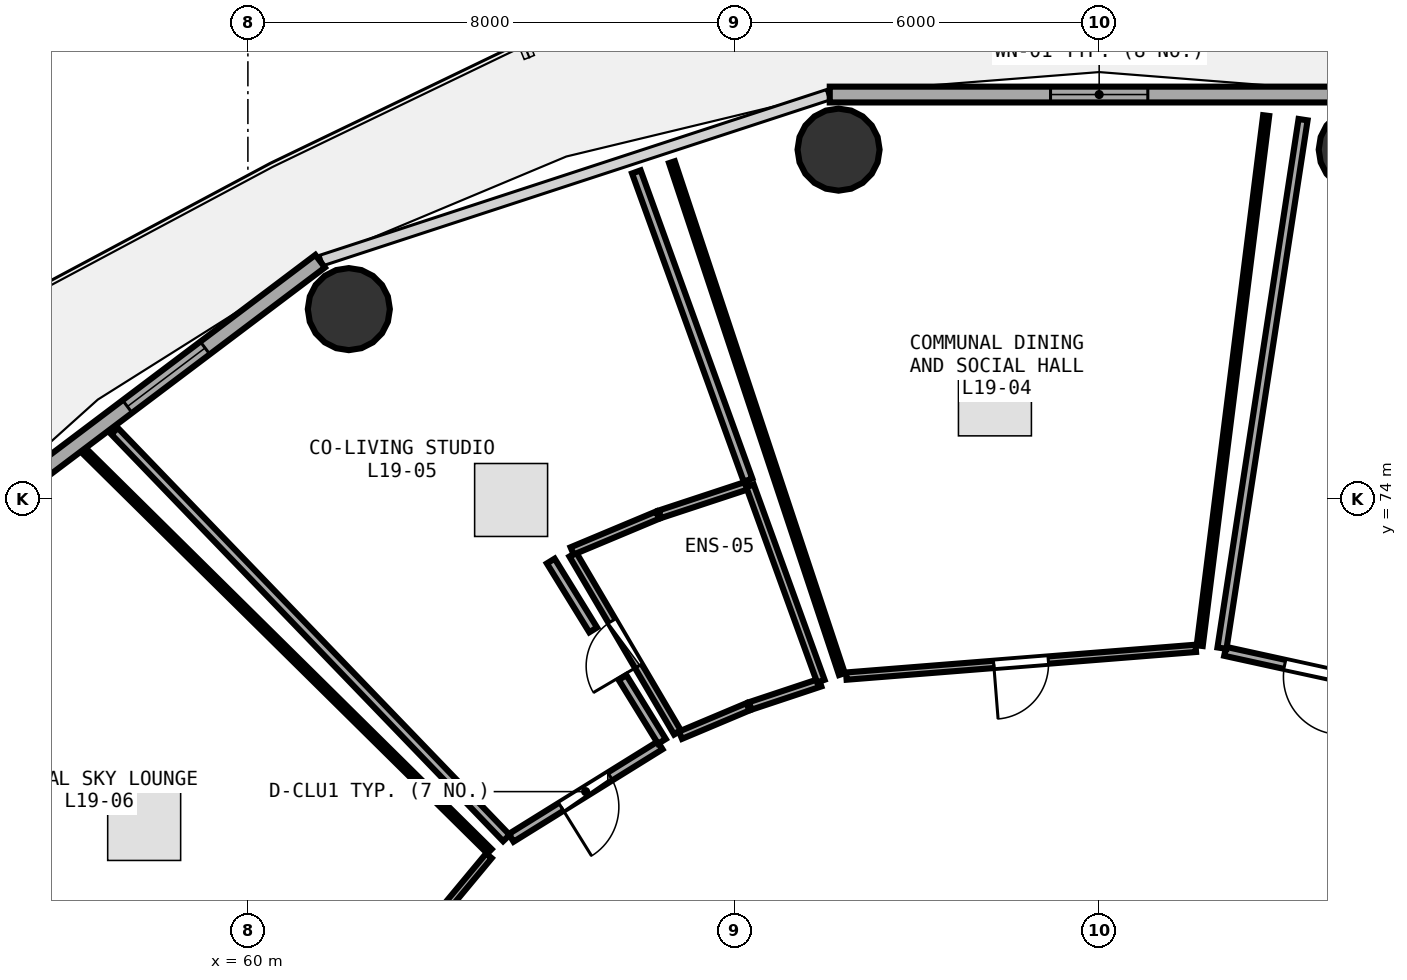
"""IFC4 building model, lengths in metres.
Left out: names, types, materials, properties, quantities, classifications, styles, units other than length and angle.
Written with IfcOpenShell. Run it as: python <this file> out.ifc"""

import sys

from ifc_helpers import new_model, si_unit, direction, frame, frame_2d, origin, origin_2d, place, context, subcontext, project, spatial, rectangle, circle, extrude, element, fill, save


model = new_model("IFC4")
c1 = context("Model", 3, precision=1e-05, world=origin(), true_north=direction((0.0, 1.0)))
c2 = subcontext(c1, "Body", "Model", "MODEL_VIEW")
j1 = project(units=[si_unit("LENGTHUNIT", "METRE"), si_unit("PLANEANGLEUNIT", "RADIAN")], contexts=[c1])
p1 = place(None, origin())
s1 = spatial("IfcSite", under=j1, at=p1, CompositionType="ELEMENT")
p2 = place(p1, origin())
s2 = spatial("IfcBuilding", under=s1, at=p2, CompositionType="ELEMENT")
p3 = place(p2, frame((0.0, 0.0, 76.35)))
s3 = spatial("IfcBuildingStorey", under=s2, at=p3, CompositionType="ELEMENT", Elevation=76.35)
for number, where, z_axis, x_axis in (
    (1, (78.286, 79.745, 0.0), (0.0, 0.0, 1.0), (1.0, 0.0, 0.0)),
    (2, (69.714, 79.745, 0.0), (0.0, 0.0, 1.0), (1.0, 0.0, 0.0)),
    (3, (61.66, 77.122, 0.0), (0.0, 0.0, 1.0), (1.0, 0.0, 0.0)),
):
    element("IfcColumn", number, at=place(p3, frame(where, z_axis=z_axis, x_axis=x_axis)), inside=s3, PredefinedType="COLUMN", context=c2, shape_type="SweptSolid", body=[
        extrude(circle(Radius=0.675, at=origin_2d()), origin(), (0.0, 0.0, 1.0), 3.75),
    ])
p4 = place(p3, frame((78.43, 80.651, 0.0), z_axis=(0.0, 0.0, 1.0), x_axis=(-1.0, 0.0, 0.0)))
e4 = element("IfcWall", 4, at=p4, inside=s3, PredefinedType="SOLIDWALL", context=c2, shape_type="SweptSolid", body=[
    extrude(rectangle(XDim=8.861, YDim=0.26, at=frame_2d((4.43, 0.0))), origin(), (0.0, 0.0, 1.0), 3.475),
])
p5 = place(p4, frame((3.63, 0.0, 0.85)))
e5 = element("IfcOpeningElement", 5, at=p5, cuts=e4, PredefinedType="OPENING", context=c2, shape_type="SweptSolid", body=[
    extrude(rectangle(XDim=1.6, YDim=1.45, at=frame_2d((0.8, 0.725))), frame((0.0, 0.14, 0.0), z_axis=(0.0, -1.0, 0.0), x_axis=(1.0, 0.0, 0.0)), (0.0, 0.0, 1.0), 0.28),
])
p6 = place(p3, frame((61.188, 77.91, 0.0), z_axis=(0.0, 0.0, 1.0), x_axis=(-0.798501507879, -0.601992808857, 0.0)))
e6 = element("IfcWall", 6, at=p6, inside=s3, PredefinedType="SOLIDWALL", context=c2, shape_type="SweptSolid", body=[
    extrude(rectangle(XDim=8.499, YDim=0.26, at=frame_2d((4.25, 0.0))), origin(), (0.0, 0.0, 1.0), 3.475),
])
p7 = place(p6, frame((2.37, 0.0, 0.85)))
e7 = element("IfcOpeningElement", 7, at=p7, cuts=e6, PredefinedType="OPENING", context=c2, shape_type="SweptSolid", body=[
    extrude(rectangle(XDim=1.6, YDim=1.45, at=frame_2d((0.8, 0.725))), frame((0.0, 0.14, 0.0), z_axis=(0.0, -1.0, 0.0), x_axis=(1.0, 0.0, 0.0)), (0.0, 0.0, 1.0), 0.28),
])
p8 = place(p3, frame((78.96, 70.861, 0.0), z_axis=(0.0, 0.0, 1.0), x_axis=(-0.976789452363, 0.214201694093, 0.0)))
e8 = element("IfcWall", 8, at=p8, inside=s3, PredefinedType="PARTITIONING", context=c2, shape_type="SweptSolid", body=[
    extrude(rectangle(XDim=2.957, YDim=0.15, at=frame_2d((1.478, 0.0))), origin(), (0.0, 0.0, 1.0), 3.48),
])
p9 = place(p8, frame((1.003, 0.0, 0.0)))
e9 = element("IfcOpeningElement", 9, at=p9, cuts=e8, PredefinedType="OPENING", context=c2, shape_type="SweptSolid", body=[
    extrude(rectangle(XDim=0.95, YDim=2.08, at=frame_2d((0.475, 1.04))), frame((0.0, 0.085, 0.0), z_axis=(0.0, -1.0, 0.0), x_axis=(1.0, 0.0, 0.0)), (0.0, 0.0, 1.0), 0.17),
])
p10 = place(p3, frame((75.589, 71.543, 0.0), z_axis=(0.0, 0.0, 1.0), x_axis=(-0.996863165686, -0.079144354814, 0.0)))
e10 = element("IfcWall", 10, at=p10, inside=s3, PredefinedType="PARTITIONING", context=c2, shape_type="SweptSolid", body=[
    extrude(rectangle(XDim=5.765, YDim=0.12, at=frame_2d((2.883, 0.0))), origin(), (0.0, 0.0, 1.0), 2.925),
])
p11 = place(p10, frame((2.433, 0.0, 0.0)))
e11 = element("IfcOpeningElement", 11, at=p11, cuts=e10, PredefinedType="OPENING", context=c2, shape_type="SweptSolid", body=[
    extrude(rectangle(XDim=0.9, YDim=2.08, at=frame_2d((0.45, 1.04))), frame((0.0, 0.07, 0.0), z_axis=(0.0, -1.0, 0.0), x_axis=(1.0, 0.0, 0.0)), (0.0, 0.0, 1.0), 0.14),
])
p12 = place(p3, frame((67.066, 70.159, 0.0), z_axis=(0.0, 0.0, 1.0), x_axis=(-0.506831608452, 0.862045080419, 0.0)))
e12 = element("IfcWall", 12, at=p12, inside=s3, PredefinedType="PLUMBINGWALL", context=c2, shape_type="SweptSolid", body=[
    extrude(rectangle(XDim=3.396, YDim=0.13, at=frame_2d((1.698, 0.0))), origin(), (0.0, 0.0, 1.0), 3.175),
])
p13 = place(p12, frame((1.268, 0.0, 0.0)))
e13 = element("IfcOpeningElement", 13, at=p13, cuts=e12, PredefinedType="OPENING", context=c2, shape_type="SweptSolid", body=[
    extrude(rectangle(XDim=0.86, YDim=2.05, at=frame_2d((0.43, 1.025))), frame((0.0, 0.075, 0.0), z_axis=(0.0, -1.0, 0.0), x_axis=(1.0, 0.0, 0.0)), (0.0, 0.0, 1.0), 0.15),
])
p14 = place(p3, frame((66.779, 69.947, 0.0), z_axis=(0.0, 0.0, 1.0), x_axis=(-0.849569495091, -0.527476703761, 0.0)))
e14 = element("IfcWall", 14, at=p14, inside=s3, PredefinedType="PARTITIONING", context=c2, shape_type="SweptSolid", body=[
    extrude(rectangle(XDim=2.883, YDim=0.15, at=frame_2d((1.441, 0.0))), origin(), (0.0, 0.0, 1.0), 2.925),
])
p15 = place(p14, frame((0.966, 0.0, 0.0)))
e15 = element("IfcOpeningElement", 15, at=p15, cuts=e14, PredefinedType="OPENING", context=c2, shape_type="SweptSolid", body=[
    extrude(rectangle(XDim=0.95, YDim=2.08, at=frame_2d((0.475, 1.04))), frame((0.0, 0.085, 0.0), z_axis=(0.0, -1.0, 0.0), x_axis=(1.0, 0.0, 0.0)), (0.0, 0.0, 1.0), 0.17),
])
p16 = place(p3, frame((63.964, 68.131, 0.0), z_axis=(0.0, 0.0, 1.0), x_axis=(-0.639104047727, -0.769120287198, 0.0)))
e16 = element("IfcWall", 16, at=p16, inside=s3, PredefinedType="PARTITIONING", context=c2, shape_type="SweptSolid", body=[
    extrude(rectangle(XDim=5.427, YDim=0.12, at=frame_2d((2.713, 0.0))), origin(), (0.0, 0.0, 1.0), 2.925),
])
p17 = place(p16, frame((2.263, 0.0, 0.0)))
e17 = element("IfcOpeningElement", 17, at=p17, cuts=e16, PredefinedType="OPENING", context=c2, shape_type="SweptSolid", body=[
    extrude(rectangle(XDim=0.9, YDim=2.08, at=frame_2d((0.45, 1.04))), frame((0.0, 0.07, 0.0), z_axis=(0.0, -1.0, 0.0), x_axis=(1.0, 0.0, 0.0)), (0.0, 0.0, 1.0), 0.14),
])
p18 = place(p3, frame((76.02, 71.546, 0.0), z_axis=(0.0, 0.0, 1.0), x_axis=(0.151710828081, 0.988424921096, 0.0)))
e18 = element("IfcWall", 18, at=p18, inside=s3, PredefinedType="PARTITIONING", context=c2, shape_type="SweptSolid", body=[
    extrude(rectangle(XDim=8.793, YDim=0.15, at=frame_2d((4.396, 0.0))), origin(), (0.0, 0.0, 1.0), 2.975),
])
p19 = place(p3, frame((69.769, 71.12, 0.0), z_axis=(0.0, 0.0, 1.0), x_axis=(-0.315178903164, 0.949032275005, 0.0)))
e19 = element("IfcWall", 19, at=p19, inside=s3, PredefinedType="PARTITIONING", context=c2, shape_type="SweptSolid", body=[
    extrude(rectangle(XDim=8.87, YDim=0.1, at=frame_2d((4.435, 0.0))), origin(), (0.0, 0.0, 1.0), 2.975),
])
p20 = place(p3, frame((76.747, 80.304, 0.0), z_axis=(0.0, 0.0, 1.0), x_axis=(-0.124421236745, -0.992229487491, 0.0)))
e20 = element("IfcWall", 20, at=p20, inside=s3, PredefinedType="PARTITIONING", context=c2, shape_type="SweptSolid", body=[
    extrude(rectangle(XDim=8.785, YDim=0.1, at=frame_2d((4.393, 0.0))), origin(), (0.0, 0.0, 1.0), 2.975),
])
p21 = place(p3, frame((69.411, 70.979, 0.0), z_axis=(0.0, 0.0, 1.0), x_axis=(-0.948784055635, -0.315925332592, 0.0)))
e21 = element("IfcWall", 21, at=p21, inside=s3, PredefinedType="PLUMBINGWALL", context=c2, shape_type="SweptSolid", body=[
    extrude(rectangle(XDim=1.211, YDim=0.13, at=frame_2d((0.605, 0.0))), origin(), (0.0, 0.0, 1.0), 3.48),
])
p22 = place(p3, frame((68.225, 70.582, 0.0), z_axis=(0.0, 0.0, 1.0), x_axis=(-0.921601034592, -0.388138548767, 0.0)))
e22 = element("IfcWall", 22, at=p22, inside=s3, PredefinedType="PLUMBINGWALL", context=c2, shape_type="SweptSolid", body=[
    extrude(rectangle(XDim=1.205, YDim=0.13, at=frame_2d((0.602, 0.0))), origin(), (0.0, 0.0, 1.0), 3.235),
])
p23 = place(p3, frame((65.333, 73.146, 0.0), z_axis=(0.0, 0.0, 1.0), x_axis=(0.922426393113, 0.38617295256, 0.0)))
e23 = element("IfcWall", 23, at=p23, inside=s3, PredefinedType="PLUMBINGWALL", context=c2, shape_type="SweptSolid", body=[
    extrude(rectangle(XDim=1.524, YDim=0.13, at=frame_2d((0.762, 0.0))), origin(), (0.0, 0.0, 1.0), 3.48),
])
p24 = place(p3, frame((66.776, 73.748, 0.0), z_axis=(0.0, 0.0, 1.0), x_axis=(0.949634335139, 0.313360223265, 0.0)))
e24 = element("IfcWall", 24, at=p24, inside=s3, PredefinedType="PLUMBINGWALL", context=c2, shape_type="SweptSolid", body=[
    extrude(rectangle(XDim=1.533, YDim=0.13, at=frame_2d((0.767, 0.0))), origin(), (0.0, 0.0, 1.0), 3.48),
])
p25 = place(p3, frame((68.258, 74.216, 0.0), z_axis=(0.0, 0.0, 1.0), x_axis=(0.341002962554, -0.940062221095, 0.0)))
e25 = element("IfcWall", 25, at=p25, inside=s3, PredefinedType="PLUMBINGWALL", context=c2, shape_type="SweptSolid", body=[
    extrude(rectangle(XDim=3.417, YDim=0.13, at=frame_2d((1.708, 0.0))), origin(), (0.0, 0.0, 1.0), 3.175),
])
p26 = place(p3, frame((64.251, 68.424, 0.0), z_axis=(0.0, 0.0, 1.0), x_axis=(-0.693645221886, 0.720316809574, 0.0)))
e26 = element("IfcWall", 26, at=p26, inside=s3, PredefinedType="PARTITIONING", context=c2, shape_type="SweptSolid", body=[
    extrude(rectangle(XDim=9.291, YDim=0.15, at=frame_2d((4.646, 0.0))), origin(), (0.0, 0.0, 1.0), 2.975),
])
p27 = place(p3, frame((66.389, 79.378, 0.0), z_axis=(0.0, 0.0, 1.0), x_axis=(0.340728267281, -0.940161820048, 0.0)))
e27 = element("IfcWall", 27, at=p27, inside=s3, PredefinedType="PARTITIONING", context=c2, shape_type="SweptSolid", body=[
    extrude(rectangle(XDim=5.39, YDim=0.15, at=frame_2d((2.695, 0.0))), origin(), (0.0, 0.0, 1.0), 2.975),
])
p28 = place(p3, frame((64.981, 72.979, 0.0), z_axis=(0.0, 0.0, 1.0), x_axis=(0.524609403226, -0.851343041345, 0.0)))
e28 = element("IfcWall", 28, at=p28, inside=s3, PredefinedType="PARTITIONING", context=c2, shape_type="SweptSolid", body=[
    extrude(rectangle(XDim=1.33, YDim=0.15, at=frame_2d((0.665, 0.0))), origin(), (0.0, 0.0, 1.0), 3.175),
])
p29 = place(p3, frame((66.162, 71.063, 0.0), z_axis=(0.0, 0.0, 1.0), x_axis=(0.52475967521, -0.851250423362, 0.0)))
e29 = element("IfcWall", 29, at=p29, inside=s3, PredefinedType="PARTITIONING", context=c2, shape_type="SweptSolid", body=[
    extrude(rectangle(XDim=1.234, YDim=0.15, at=frame_2d((0.617, 0.0))), origin(), (0.0, 0.0, 1.0), 3.235),
])
p30 = place(p3, frame((60.42, 63.927, 0.0), z_axis=(0.0, 0.0, 1.0), x_axis=(-0.920723225206, 0.390216276654, 0.0)))
e30 = element("IfcWall", 30, at=p30, inside=s3, PredefinedType="PARTITIONING", context=c2, shape_type="SweptSolid", body=[
    extrude(rectangle(XDim=9.756, YDim=0.1, at=frame_2d((4.878, 0.0))), origin(), (0.0, 0.0, 1.0), 2.925),
])
p31 = place(p3, frame((57.344, 74.756, 0.0), z_axis=(0.0, 0.0, 1.0), x_axis=(0.711285789258, -0.702902927864, 0.0)))
e31 = element("IfcWall", 31, at=p31, inside=s3, PredefinedType="PARTITIONING", context=c2, shape_type="SweptSolid", body=[
    extrude(rectangle(XDim=9.32, YDim=0.1, at=frame_2d((4.66, 0.0))), origin(), (0.0, 0.0, 1.0), 2.975),
])
p32 = place(p5, origin())
e32 = element("IfcWindow", 32, at=p32, inside=s3, PartitioningType="SINGLE_PANEL", PredefinedType="WINDOW", context=c2, shape_type="SweptSolid", body=[
    extrude(rectangle(XDim=1.6, YDim=1.45, at=frame_2d((0.8, 0.725))), frame((0.0, 0.03, 0.0), z_axis=(0.0, -1.0, 0.0), x_axis=(1.0, 0.0, 0.0)), (0.0, 0.0, 1.0), 0.06),
])
fill(e5, e32)
p33 = place(p7, origin())
e33 = element("IfcWindow", 33, at=p33, inside=s3, PartitioningType="SINGLE_PANEL", PredefinedType="WINDOW", context=c2, shape_type="SweptSolid", body=[
    extrude(rectangle(XDim=1.6, YDim=1.45, at=frame_2d((0.8, 0.725))), frame((0.0, 0.03, 0.0), z_axis=(0.0, -1.0, 0.0), x_axis=(1.0, 0.0, 0.0)), (0.0, 0.0, 1.0), 0.06),
])
fill(e7, e33)
p34 = place(p9, origin())
e34 = element("IfcDoor", 34, at=p34, inside=s3, OperationType="SINGLE_SWING_LEFT", PredefinedType="DOOR", context=c2, shape_type="SweptSolid", body=[
    extrude(rectangle(XDim=0.95, YDim=2.08, at=frame_2d((0.475, 1.04))), frame((0.0, 0.025, 0.0), z_axis=(0.0, -1.0, 0.0), x_axis=(1.0, 0.0, 0.0)), (0.0, 0.0, 1.0), 0.05),
])
fill(e9, e34)
p35 = place(p11, origin())
e35 = element("IfcDoor", 35, at=p35, inside=s3, OperationType="SINGLE_SWING_RIGHT", PredefinedType="DOOR", context=c2, shape_type="SweptSolid", body=[
    extrude(rectangle(XDim=0.9, YDim=2.08, at=frame_2d((0.45, 1.04))), frame((0.0, 0.025, 0.0), z_axis=(0.0, -1.0, 0.0), x_axis=(1.0, 0.0, 0.0)), (0.0, 0.0, 1.0), 0.05),
])
fill(e11, e35)
p36 = place(p13, origin())
e36 = element("IfcDoor", 36, at=p36, inside=s3, OperationType="SINGLE_SWING_LEFT", PredefinedType="DOOR", context=c2, shape_type="SweptSolid", body=[
    extrude(rectangle(XDim=0.86, YDim=2.05, at=frame_2d((0.43, 1.025))), frame((0.0, 0.025, 0.0), z_axis=(0.0, -1.0, 0.0), x_axis=(1.0, 0.0, 0.0)), (0.0, 0.0, 1.0), 0.05),
])
fill(e13, e36)
p37 = place(p15, origin())
e37 = element("IfcDoor", 37, at=p37, inside=s3, OperationType="SINGLE_SWING_RIGHT", PredefinedType="DOOR", context=c2, shape_type="SweptSolid", body=[
    extrude(rectangle(XDim=0.95, YDim=2.08, at=frame_2d((0.475, 1.04))), frame((0.0, 0.025, 0.0), z_axis=(0.0, -1.0, 0.0), x_axis=(1.0, 0.0, 0.0)), (0.0, 0.0, 1.0), 0.05),
])
fill(e15, e37)
save(model, sys.argv[1])
